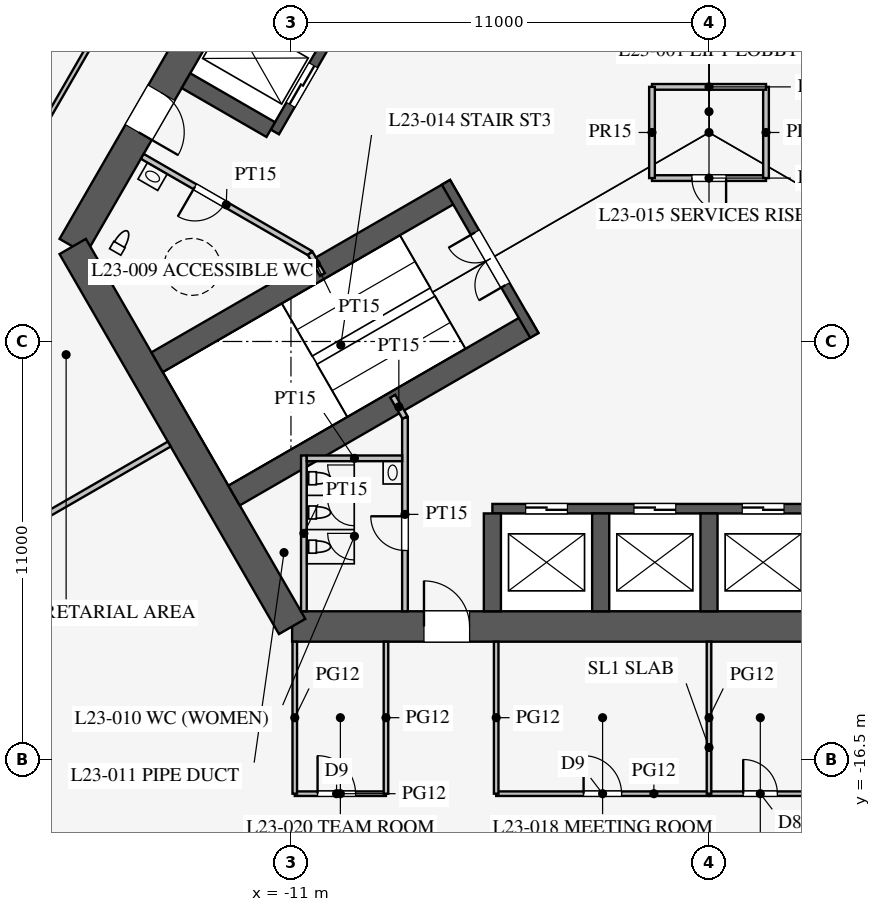
"""IFC4 building model, lengths in metres.
Left out: names, types, materials, properties, quantities, classifications, styles, units other than length and angle.
Written with IfcOpenShell. Run it as: python <this file> out.ifc"""

import sys

from ifc_helpers import new_model, si_unit, direction, frame, frame_2d, origin, place, context, subcontext, project, spatial, rectangle, extrude, element, fill, save


model = new_model("IFC4")
c1 = context("Model", 3, precision=1e-05, world=origin(), true_north=direction((0.0, 1.0)))
c2 = subcontext(c1, "Body", "Model", "MODEL_VIEW")
j1 = project(units=[si_unit("LENGTHUNIT", "METRE"), si_unit("PLANEANGLEUNIT", "RADIAN")], contexts=[c1])
p1 = place(None, origin())
s1 = spatial("IfcSite", under=j1, at=p1, CompositionType="ELEMENT")
p2 = place(p1, origin())
s2 = spatial("IfcBuilding", under=s1, at=p2, CompositionType="ELEMENT")
p3 = place(p2, frame((0.0, 0.0, 103.1)))
s3 = spatial("IfcBuildingStorey", under=s2, at=p3, CompositionType="ELEMENT", Elevation=103.1)
p4 = place(p3, frame((-10.97, -13.0, 0.0), z_axis=(0.0, 0.0, 1.0), x_axis=(1.0, 0.0, 0.0)))
e1 = element("IfcWall", 1, at=p4, inside=s3, PredefinedType="SHEAR", context=c2, shape_type="SweptSolid", body=[
    extrude(rectangle(XDim=21.939, YDim=0.8, at=frame_2d((10.97, 0.0))), origin(), (0.0, 0.0, 1.0), 4.2),
])
p5 = place(p4, frame((17.27, 0.0, 0.0)))
e2 = element("IfcOpeningElement", 2, at=p5, cuts=e1, PredefinedType="OPENING", context=c2, shape_type="SweptSolid", body=[
    extrude(rectangle(XDim=1.2, YDim=2.1, at=frame_2d((0.6, 1.05))), frame((0.0, 0.41, 0.0), z_axis=(0.0, -1.0, 0.0), x_axis=(1.0, 0.0, 0.0)), (0.0, 0.0, 1.0), 0.82),
])
p6 = place(p4, frame((3.47, 0.0, 0.0)))
e3 = element("IfcOpeningElement", 3, at=p6, cuts=e1, PredefinedType="OPENING", context=c2, shape_type="SweptSolid", body=[
    extrude(rectangle(XDim=1.2, YDim=2.1, at=frame_2d((0.6, 1.05))), frame((0.0, 0.41, 0.0), z_axis=(0.0, -1.0, 0.0), x_axis=(1.0, 0.0, 0.0)), (0.0, 0.0, 1.0), 0.82),
])
p7 = place(p3, frame((-5.773, 16.0, 0.0), z_axis=(0.0, 0.0, 1.0), x_axis=(-0.500002442456, -0.866023993627, 0.0)))
e4 = element("IfcWall", 4, at=p7, inside=s3, PredefinedType="SHEAR", context=c2, shape_type="SweptSolid", body=[
    extrude(rectangle(XDim=21.939, YDim=0.8, at=frame_2d((10.97, 0.0))), origin(), (0.0, 0.0, 1.0), 4.2),
])
p8 = place(p7, frame((17.27, 0.0, 0.0)))
e5 = element("IfcOpeningElement", 5, at=p8, cuts=e4, PredefinedType="OPENING", context=c2, shape_type="SweptSolid", body=[
    extrude(rectangle(XDim=1.2, YDim=2.1, at=frame_2d((0.6, 1.05))), frame((0.0, 0.41, 0.0), z_axis=(0.0, -1.0, 0.0), x_axis=(1.0, 0.0, 0.0)), (0.0, 0.0, 1.0), 0.82),
])
p9 = place(p7, frame((3.47, 0.0, 0.0)))
e6 = element("IfcOpeningElement", 6, at=p9, cuts=e4, PredefinedType="OPENING", context=c2, shape_type="SweptSolid", body=[
    extrude(rectangle(XDim=1.2, YDim=2.1, at=frame_2d((0.6, 1.05))), frame((0.0, 0.41, 0.0), z_axis=(0.0, -1.0, 0.0), x_axis=(1.0, 0.0, 0.0)), (0.0, 0.0, 1.0), 0.82),
])
p10 = place(p3, frame((-16.743, -3.0, 0.0), z_axis=(0.0, 0.0, 1.0), x_axis=(0.499995765644, -0.866027848477, 0.0)))
e7 = element("IfcWall", 7, at=p10, inside=s3, PredefinedType="SHEAR", context=c2, shape_type="SweptSolid", body=[
    extrude(rectangle(XDim=11.547, YDim=0.8, at=frame_2d((5.773, 0.0))), origin(), (0.0, 0.0, 1.0), 4.2),
])
p11 = place(p3, frame((-5.7, -9.9, 0.0), z_axis=(0.0, 0.0, 1.0), x_axis=(1.0, 0.0, 0.0)))
e8 = element("IfcWall", 8, at=p11, inside=s3, PredefinedType="SHEAR", context=c2, shape_type="SweptSolid", body=[
    extrude(rectangle(XDim=11.4, YDim=0.25, at=frame_2d((5.7, 0.0))), origin(), (0.0, 0.0, 1.0), 4.2),
])
p12 = place(p11, frame((0.875, 0.0, 0.0)))
e9 = element("IfcOpeningElement", 9, at=p12, cuts=e8, PredefinedType="OPENING", context=c2, shape_type="SweptSolid", body=[
    extrude(rectangle(XDim=1.1, YDim=2.2, at=frame_2d((0.55, 1.1))), frame((0.0, 0.135, 0.0), z_axis=(0.0, -1.0, 0.0), x_axis=(1.0, 0.0, 0.0)), (0.0, 0.0, 1.0), 0.27),
])
p13 = place(p11, frame((3.725, 0.0, 0.0)))
e10 = element("IfcOpeningElement", 10, at=p13, cuts=e8, PredefinedType="OPENING", context=c2, shape_type="SweptSolid", body=[
    extrude(rectangle(XDim=1.1, YDim=2.2, at=frame_2d((0.55, 1.1))), frame((0.0, 0.135, 0.0), z_axis=(0.0, -1.0, 0.0), x_axis=(1.0, 0.0, 0.0)), (0.0, 0.0, 1.0), 0.27),
])
p14 = place(p11, frame((6.575, 0.0, 0.0)))
e11 = element("IfcOpeningElement", 11, at=p14, cuts=e8, PredefinedType="OPENING", context=c2, shape_type="SweptSolid", body=[
    extrude(rectangle(XDim=1.1, YDim=2.2, at=frame_2d((0.55, 1.1))), frame((0.0, 0.135, 0.0), z_axis=(0.0, -1.0, 0.0), x_axis=(1.0, 0.0, 0.0)), (0.0, 0.0, 1.0), 0.27),
])
p15 = place(p11, frame((9.425, 0.0, 0.0)))
e12 = element("IfcOpeningElement", 12, at=p15, cuts=e8, PredefinedType="OPENING", context=c2, shape_type="SweptSolid", body=[
    extrude(rectangle(XDim=1.1, YDim=2.2, at=frame_2d((0.55, 1.1))), frame((0.0, 0.135, 0.0), z_axis=(0.0, -1.0, 0.0), x_axis=(1.0, 0.0, 0.0)), (0.0, 0.0, 1.0), 0.27),
])
for number, where, z_axis, x_axis in (
    (13, (-5.7, -10.025, 0.0), (0.0, 0.0, 1.0), (0.0, -1.0, 0.0)),
    (14, (-2.85, -10.025, 0.0), (0.0, 0.0, 1.0), (0.0, -1.0, 0.0)),
    (15, (0.0, -10.025, 0.0), (0.0, 0.0, 1.0), (0.0, -1.0, 0.0)),
):
    element("IfcWall", number, at=place(p3, frame(where, z_axis=z_axis, x_axis=x_axis)), inside=s3, PredefinedType="SHEAR", context=c2, shape_type="SweptSolid", body=[
        extrude(rectangle(XDim=2.575, YDim=0.45, at=frame_2d((1.288, 0.0))), origin(), (0.0, 0.0, 1.0), 4.2),
    ])
p16 = place(p3, frame((-5.724, 9.886, 0.0), z_axis=(0.0, 0.0, 1.0), x_axis=(-0.500001763848, -0.866024385424, 0.0)))
e16 = element("IfcWall", 16, at=p16, inside=s3, PredefinedType="SHEAR", context=c2, shape_type="SweptSolid", body=[
    extrude(rectangle(XDim=11.4, YDim=0.25, at=frame_2d((5.7, 0.0))), origin(), (0.0, 0.0, 1.0), 4.2),
])
p17 = place(p16, frame((6.525, 0.0, 0.0)))
e17 = element("IfcOpeningElement", 17, at=p17, cuts=e16, PredefinedType="OPENING", context=c2, shape_type="SweptSolid", body=[
    extrude(rectangle(XDim=1.2, YDim=2.2, at=frame_2d((0.6, 1.1))), frame((0.0, 0.135, 0.0), z_axis=(0.0, -1.0, 0.0), x_axis=(1.0, 0.0, 0.0)), (0.0, 0.0, 1.0), 0.27),
])
p18 = place(p16, frame((9.375, 0.0, 0.0)))
e18 = element("IfcOpeningElement", 18, at=p18, cuts=e16, PredefinedType="OPENING", context=c2, shape_type="SweptSolid", body=[
    extrude(rectangle(XDim=1.2, YDim=2.2, at=frame_2d((0.6, 1.1))), frame((0.0, 0.135, 0.0), z_axis=(0.0, -1.0, 0.0), x_axis=(1.0, 0.0, 0.0)), (0.0, 0.0, 1.0), 0.27),
])
p19 = place(p3, frame((-11.532, 0.076, 0.0), z_axis=(0.0, 0.0, 1.0), x_axis=(-0.866005588531, 0.500034319456, 0.0)))
e19 = element("IfcWall", 19, at=p19, inside=s3, PredefinedType="SHEAR", context=c2, shape_type="SweptSolid", body=[
    extrude(rectangle(XDim=2.575, YDim=0.45, at=frame_2d((1.288, 0.0))), origin(), (0.0, 0.0, 1.0), 4.2),
])
for number, where, z_axis, x_axis in (
    (20, (-6.663, -1.509, 0.0), (0.0, 0.0, 1.0), (-0.866, -0.5, 0.0)),
    (21, (-4.638, -5.016, 0.0), (0.0, 0.0, 1.0), (-0.866, -0.5, 0.0)),
):
    element("IfcWall", number, at=place(p3, frame(where, z_axis=z_axis, x_axis=x_axis)), inside=s3, PredefinedType="SHEAR", context=c2, shape_type="SweptSolid", body=[
        extrude(rectangle(XDim=9.075, YDim=0.6, at=frame_2d((4.538, 0.0))), origin(), (0.0, 0.0, 1.0), 4.2),
    ])
p20 = place(p3, frame((-6.922, -1.312, 0.0), z_axis=(0.0, 0.0, 1.0), x_axis=(0.499984536904, -0.866034331223, 0.0)))
e22 = element("IfcWall", 22, at=p20, inside=s3, PredefinedType="SHEAR", context=c2, shape_type="SweptSolid", body=[
    extrude(rectangle(XDim=4.65, YDim=0.25, at=frame_2d((2.325, 0.0))), origin(), (0.0, 0.0, 1.0), 4.2),
])
p21 = place(p20, frame((1.525, 0.0, 0.0)))
e23 = element("IfcOpeningElement", 23, at=p21, cuts=e22, PredefinedType="OPENING", context=c2, shape_type="SweptSolid", body=[
    extrude(rectangle(XDim=1.6, YDim=2.1, at=frame_2d((0.8, 1.05))), frame((0.0, 0.135, 0.0), z_axis=(0.0, -1.0, 0.0), x_axis=(1.0, 0.0, 0.0)), (0.0, 0.0, 1.0), 0.27),
])
p22 = place(p3, frame((-8.0, -7.5, 0.0), z_axis=(0.0, 0.0, 1.0), x_axis=(0.0, -1.0, 0.0)))
e24 = element("IfcWall", 24, at=p22, inside=s3, PredefinedType="PARTITIONING", context=c2, shape_type="SweptSolid", body=[
    extrude(rectangle(XDim=5.1, YDim=0.15, at=frame_2d((2.55, 0.0))), origin(), (0.0, 0.0, 1.0), 4.0),
])
p23 = place(p22, frame((2.6, 0.0, 0.0)))
e25 = element("IfcOpeningElement", 25, at=p23, cuts=e24, PredefinedType="OPENING", context=c2, shape_type="SweptSolid", body=[
    extrude(rectangle(XDim=0.9, YDim=2.1, at=frame_2d((0.45, 1.05))), frame((0.0, 0.085, 0.0), z_axis=(0.0, -1.0, 0.0), x_axis=(1.0, 0.0, 0.0)), (0.0, 0.0, 1.0), 0.17),
])
p24 = place(p3, frame((-10.495, -3.178, 0.0), z_axis=(0.0, 0.0, 1.0), x_axis=(-0.86602216432, 0.500005610874, 0.0)))
e26 = element("IfcWall", 26, at=p24, inside=s3, PredefinedType="PARTITIONING", context=c2, shape_type="SweptSolid", body=[
    extrude(rectangle(XDim=5.1, YDim=0.15, at=frame_2d((2.55, 0.0))), origin(), (0.0, 0.0, 1.0), 4.0),
])
p25 = place(p24, frame((2.6, 0.0, 0.0)))
e27 = element("IfcOpeningElement", 27, at=p25, cuts=e26, PredefinedType="OPENING", context=c2, shape_type="SweptSolid", body=[
    extrude(rectangle(XDim=0.9, YDim=2.1, at=frame_2d((0.45, 1.05))), frame((0.0, 0.085, 0.0), z_axis=(0.0, -1.0, 0.0), x_axis=(1.0, 0.0, 0.0)), (0.0, 0.0, 1.0), 0.17),
])
for number, where, z_axis, x_axis in (
    (28, (-10.495, -3.178, 0.0), (0.0, 0.0, 1.0), (0.5, -0.866, 0.0)),
    (29, (-8.0, -7.5, 0.0), (0.0, 0.0, 1.0), (-0.5, 0.866, 0.0)),
):
    element("IfcWall", number, at=place(p3, frame(where, z_axis=z_axis, x_axis=x_axis)), inside=s3, PredefinedType="PARTITIONING", context=c2, shape_type="SweptSolid", body=[
        extrude(rectangle(XDim=0.645, YDim=0.15, at=frame_2d((0.323, 0.0))), origin(), (0.0, 0.0, 1.0), 4.0),
    ])
p26 = place(p3, frame((-10.66, -8.5, 0.0), z_axis=(0.0, 0.0, 1.0), x_axis=(0.0, -1.0, 0.0)))
e30 = element("IfcWall", 30, at=p26, inside=s3, PredefinedType="PARTITIONING", context=c2, shape_type="SweptSolid", body=[
    extrude(rectangle(XDim=4.1, YDim=0.15, at=frame_2d((2.05, 0.0))), origin(), (0.0, 0.0, 1.0), 4.0),
])
p27 = place(p3, frame((-8.075, -8.575, 0.0), z_axis=(0.0, 0.0, 1.0), x_axis=(-1.0, 0.0, 0.0)))
e31 = element("IfcWall", 31, at=p27, inside=s3, PredefinedType="PARTITIONING", context=c2, shape_type="SweptSolid", body=[
    extrude(rectangle(XDim=2.51, YDim=0.15, at=frame_2d((1.255, 0.0))), origin(), (0.0, 0.0, 1.0), 4.0),
])
p28 = place(p3, frame((-1.5, -1.2, 0.0), z_axis=(0.0, 0.0, 1.0), x_axis=(1.0, 0.0, 0.0)))
e32 = element("IfcWall", 32, at=p28, inside=s3, PredefinedType="PARTITIONING", context=c2, shape_type="SweptSolid", body=[
    extrude(rectangle(XDim=3.0, YDim=0.15, at=frame_2d((1.5, 0.0))), origin(), (0.0, 0.0, 1.0), 4.0),
])
p29 = place(p28, frame((1.05, 0.0, 0.0)))
e33 = element("IfcOpeningElement", 33, at=p29, cuts=e32, PredefinedType="OPENING", context=c2, shape_type="SweptSolid", body=[
    extrude(rectangle(XDim=0.9, YDim=2.1, at=frame_2d((0.45, 1.05))), frame((0.0, 0.085, 0.0), z_axis=(0.0, -1.0, 0.0), x_axis=(1.0, 0.0, 0.0)), (0.0, 0.0, 1.0), 0.17),
])
p30 = place(p3, frame((1.5, -1.2, 0.0), z_axis=(0.0, 0.0, 1.0), x_axis=(0.0, 1.0, 0.0)))
e34 = element("IfcWall", 34, at=p30, inside=s3, PredefinedType="PARTITIONING", context=c2, shape_type="SweptSolid", body=[
    extrude(rectangle(XDim=2.4, YDim=0.15, at=frame_2d((1.2, 0.0))), origin(), (0.0, 0.0, 1.0), 4.0),
])
p31 = place(p3, frame((1.5, 1.2, 0.0), z_axis=(0.0, 0.0, 1.0), x_axis=(-1.0, 0.0, 0.0)))
e35 = element("IfcWall", 35, at=p31, inside=s3, PredefinedType="PARTITIONING", context=c2, shape_type="SweptSolid", body=[
    extrude(rectangle(XDim=3.0, YDim=0.15, at=frame_2d((1.5, 0.0))), origin(), (0.0, 0.0, 1.0), 4.0),
])
p32 = place(p3, frame((-1.5, 1.2, 0.0), z_axis=(0.0, 0.0, 1.0), x_axis=(0.0, -1.0, 0.0)))
e36 = element("IfcWall", 36, at=p32, inside=s3, PredefinedType="PARTITIONING", context=c2, shape_type="SweptSolid", body=[
    extrude(rectangle(XDim=2.4, YDim=0.15, at=frame_2d((1.2, 0.0))), origin(), (0.0, 0.0, 1.0), 4.0),
])
p33 = place(p3, frame((-14.203, -8.2, 0.0), z_axis=(0.0, 0.0, 1.0), x_axis=(-0.866024668836, -0.500001272966, 0.0)))
e37 = element("IfcWall", 37, at=p33, inside=s3, PredefinedType="PARTITIONING", context=c2, shape_type="SweptSolid", body=[
    extrude(rectangle(XDim=16.65, YDim=0.15, at=frame_2d((8.325, 0.0))), origin(), (0.0, 0.0, 1.0), 2.3),
])
p34 = place(p3, frame((0.0, -17.4, 0.0), z_axis=(0.0, 0.0, 1.0), x_axis=(1.0, 0.0, 0.0)))
e38 = element("IfcWall", 38, at=p34, inside=s3, PredefinedType="PARTITIONING", context=c2, shape_type="SweptSolid", body=[
    extrude(rectangle(XDim=2.7, YDim=0.12, at=frame_2d((1.35, 0.0))), origin(), (0.0, 0.0, 1.0), 2.9),
])
p35 = place(p34, frame((0.9, 0.0, 0.15)))
e39 = element("IfcOpeningElement", 39, at=p35, cuts=e38, PredefinedType="OPENING", context=c2, shape_type="SweptSolid", body=[
    extrude(rectangle(XDim=0.9, YDim=2.1, at=frame_2d((0.45, 1.05))), frame((0.0, 0.07, 0.0), z_axis=(0.0, -1.0, 0.0), x_axis=(1.0, 0.0, 0.0)), (0.0, 0.0, 1.0), 0.14),
])
p36 = place(p3, frame((-10.9, -17.4, 0.0), z_axis=(0.0, 0.0, 1.0), x_axis=(1.0, 0.0, 0.0)))
e40 = element("IfcWall", 40, at=p36, inside=s3, PredefinedType="PARTITIONING", context=c2, shape_type="SweptSolid", body=[
    extrude(rectangle(XDim=2.4, YDim=0.12, at=frame_2d((1.2, 0.0))), origin(), (0.0, 0.0, 1.0), 2.9),
])
p37 = place(p36, frame((0.6, 0.0, 0.15)))
e41 = element("IfcOpeningElement", 41, at=p37, cuts=e40, PredefinedType="OPENING", context=c2, shape_type="SweptSolid", body=[
    extrude(rectangle(XDim=1.0, YDim=2.1, at=frame_2d((0.5, 1.05))), frame((0.0, 0.07, 0.0), z_axis=(0.0, -1.0, 0.0), x_axis=(1.0, 0.0, 0.0)), (0.0, 0.0, 1.0), 0.14),
])
p38 = place(p3, frame((-5.6, -17.4, 0.0), z_axis=(0.0, 0.0, 1.0), x_axis=(1.0, 0.0, 0.0)))
e42 = element("IfcWall", 42, at=p38, inside=s3, PredefinedType="PARTITIONING", context=c2, shape_type="SweptSolid", body=[
    extrude(rectangle(XDim=5.6, YDim=0.12, at=frame_2d((2.8, 0.0))), origin(), (0.0, 0.0, 1.0), 2.9),
])
p39 = place(p38, frame((2.3, 0.0, 0.15)))
e43 = element("IfcOpeningElement", 43, at=p39, cuts=e42, PredefinedType="OPENING", context=c2, shape_type="SweptSolid", body=[
    extrude(rectangle(XDim=1.0, YDim=2.1, at=frame_2d((0.5, 1.05))), frame((0.0, 0.07, 0.0), z_axis=(0.0, -1.0, 0.0), x_axis=(1.0, 0.0, 0.0)), (0.0, 0.0, 1.0), 0.14),
])
p40 = place(p3, frame((0.0, -13.4, 0.0), z_axis=(0.0, 0.0, 1.0), x_axis=(0.0, -1.0, 0.0)))
e44 = element("IfcWall", 44, at=p40, inside=s3, PredefinedType="PARTITIONING", context=c2, shape_type="SweptSolid", body=[
    extrude(rectangle(XDim=4.0, YDim=0.12, at=frame_2d((2.0, 0.0))), origin(), (0.0, 0.0, 1.0), 2.4),
])
for number, where, z_axis, x_axis in (
    (45, (-10.9, -13.4, 0.0), (0.0, 0.0, 1.0), (0.0, -1.0, 0.0)),
    (46, (-5.6, -13.4, 0.0), (0.0, 0.0, 1.0), (0.0, -1.0, 0.0)),
    (47, (-8.5, -13.4, 0.0), (0.0, 0.0, 1.0), (0.0, -1.0, 0.0)),
):
    element("IfcWall", number, at=place(p3, frame(where, z_axis=z_axis, x_axis=x_axis)), inside=s3, PredefinedType="PARTITIONING", context=c2, shape_type="SweptSolid", body=[
        extrude(rectangle(XDim=4.0, YDim=0.12, at=frame_2d((2.0, 0.0))), origin(), (0.0, 0.0, 1.0), 2.9),
    ])
p41 = place(p3, frame((-0.016, 30.491, 0.0), z_axis=(0.0, 0.0, 1.0), x_axis=(-0.50000091641, -0.866024874695, 0.0)))
e48 = element("IfcWall", 48, at=p41, inside=s3, PredefinedType="PARTITIONING", context=c2, shape_type="SweptSolid", body=[
    extrude(rectangle(XDim=52.796, YDim=0.12, at=frame_2d((26.398, 0.0))), origin(), (0.0, 0.0, 1.0), 2.9),
])
p42 = place(p41, frame((10.2, 0.0, 0.15)))
e49 = element("IfcOpeningElement", 49, at=p42, cuts=e48, PredefinedType="OPENING", context=c2, shape_type="SweptSolid", body=[
    extrude(rectangle(XDim=1.8, YDim=2.1, at=frame_2d((0.9, 1.05))), frame((0.0, 0.07, 0.0), z_axis=(0.0, -1.0, 0.0), x_axis=(1.0, 0.0, 0.0)), (0.0, 0.0, 1.0), 0.14),
])
p43 = place(p41, frame((40.8, 0.0, 0.15)))
e50 = element("IfcOpeningElement", 50, at=p43, cuts=e48, PredefinedType="OPENING", context=c2, shape_type="SweptSolid", body=[
    extrude(rectangle(XDim=1.8, YDim=2.1, at=frame_2d((0.9, 1.05))), frame((0.0, 0.07, 0.0), z_axis=(0.0, -1.0, 0.0), x_axis=(1.0, 0.0, 0.0)), (0.0, 0.0, 1.0), 0.14),
])
p44 = place(p23, frame((0.9, 0.0, 0.0), z_axis=(0.0, 0.0, 1.0), x_axis=(-1.0, 0.0, 0.0)))
e51 = element("IfcDoor", 51, at=p44, inside=s3, OperationType="SINGLE_SWING_RIGHT", PredefinedType="DOOR", context=c2, shape_type="SweptSolid", body=[
    extrude(rectangle(XDim=0.9, YDim=2.1, at=frame_2d((0.45, 1.05))), frame((0.0, 0.025, 0.0), z_axis=(0.0, -1.0, 0.0), x_axis=(1.0, 0.0, 0.0)), (0.0, 0.0, 1.0), 0.05),
])
fill(e25, e51)
p45 = place(p25, origin())
e52 = element("IfcDoor", 52, at=p45, inside=s3, OperationType="SINGLE_SWING_RIGHT", PredefinedType="DOOR", context=c2, shape_type="SweptSolid", body=[
    extrude(rectangle(XDim=0.9, YDim=2.1, at=frame_2d((0.45, 1.05))), frame((0.0, 0.025, 0.0), z_axis=(0.0, -1.0, 0.0), x_axis=(1.0, 0.0, 0.0)), (0.0, 0.0, 1.0), 0.05),
])
fill(e27, e52)
p46 = place(p29, frame((0.9, 0.0, 0.0), z_axis=(0.0, 0.0, 1.0), x_axis=(-1.0, 0.0, 0.0)))
e53 = element("IfcDoor", 53, at=p46, inside=s3, OperationType="SINGLE_SWING_LEFT", PredefinedType="DOOR", context=c2, shape_type="SweptSolid", body=[
    extrude(rectangle(XDim=0.9, YDim=2.1, at=frame_2d((0.45, 1.05))), frame((0.0, 0.025, 0.0), z_axis=(0.0, -1.0, 0.0), x_axis=(1.0, 0.0, 0.0)), (0.0, 0.0, 1.0), 0.05),
])
fill(e33, e53)
p47 = place(p21, frame((1.6, 0.0, 0.0), z_axis=(0.0, 0.0, 1.0), x_axis=(-1.0, 0.0, 0.0)))
e54 = element("IfcDoor", 54, at=p47, inside=s3, OperationType="DOUBLE_DOOR_SINGLE_SWING", PredefinedType="DOOR", context=c2, shape_type="SweptSolid", body=[
    extrude(rectangle(XDim=1.6, YDim=2.1, at=frame_2d((0.8, 1.05))), frame((0.0, 0.025, 0.0), z_axis=(0.0, -1.0, 0.0), x_axis=(1.0, 0.0, 0.0)), (0.0, 0.0, 1.0), 0.05),
])
fill(e23, e54)
p48 = place(p6, origin())
e55 = element("IfcDoor", 55, at=p48, inside=s3, OperationType="SINGLE_SWING_LEFT", PredefinedType="DOOR", context=c2, shape_type="SweptSolid", body=[
    extrude(rectangle(XDim=1.2, YDim=2.1, at=frame_2d((0.6, 1.05))), frame((0.0, 0.025, 0.0), z_axis=(0.0, -1.0, 0.0), x_axis=(1.0, 0.0, 0.0)), (0.0, 0.0, 1.0), 0.05),
])
fill(e3, e55)
p49 = place(p8, origin())
e56 = element("IfcDoor", 56, at=p49, inside=s3, OperationType="SINGLE_SWING_RIGHT", PredefinedType="DOOR", context=c2, shape_type="SweptSolid", body=[
    extrude(rectangle(XDim=1.2, YDim=2.1, at=frame_2d((0.6, 1.05))), frame((0.0, 0.025, 0.0), z_axis=(0.0, -1.0, 0.0), x_axis=(1.0, 0.0, 0.0)), (0.0, 0.0, 1.0), 0.05),
])
fill(e5, e56)
p50 = place(p39, origin())
e57 = element("IfcDoor", 57, at=p50, inside=s3, OperationType="SINGLE_SWING_LEFT", PredefinedType="DOOR", context=c2, shape_type="SweptSolid", body=[
    extrude(rectangle(XDim=1.0, YDim=2.1, at=frame_2d((0.5, 1.05))), frame((0.0, 0.025, 0.0), z_axis=(0.0, -1.0, 0.0), x_axis=(1.0, 0.0, 0.0)), (0.0, 0.0, 1.0), 0.05),
])
fill(e43, e57)
p51 = place(p35, origin())
e58 = element("IfcDoor", 58, at=p51, inside=s3, OperationType="SINGLE_SWING_LEFT", PredefinedType="DOOR", context=c2, shape_type="SweptSolid", body=[
    extrude(rectangle(XDim=0.9, YDim=2.1, at=frame_2d((0.45, 1.05))), frame((0.0, 0.025, 0.0), z_axis=(0.0, -1.0, 0.0), x_axis=(1.0, 0.0, 0.0)), (0.0, 0.0, 1.0), 0.05),
])
fill(e39, e58)
p52 = place(p37, origin())
e59 = element("IfcDoor", 59, at=p52, inside=s3, OperationType="SINGLE_SWING_LEFT", PredefinedType="DOOR", context=c2, shape_type="SweptSolid", body=[
    extrude(rectangle(XDim=1.0, YDim=2.1, at=frame_2d((0.5, 1.05))), frame((0.0, 0.025, 0.0), z_axis=(0.0, -1.0, 0.0), x_axis=(1.0, 0.0, 0.0)), (0.0, 0.0, 1.0), 0.05),
])
fill(e41, e59)
p53 = place(p12, origin())
e60 = element("IfcDoor", 60, at=p53, inside=s3, OperationType="DOUBLE_DOOR_SLIDING", PredefinedType="DOOR", context=c2, shape_type="SweptSolid", body=[
    extrude(rectangle(XDim=1.1, YDim=2.2, at=frame_2d((0.55, 1.1))), frame((0.0, 0.025, 0.0), z_axis=(0.0, -1.0, 0.0), x_axis=(1.0, 0.0, 0.0)), (0.0, 0.0, 1.0), 0.05),
])
fill(e9, e60)
p54 = place(p13, origin())
e61 = element("IfcDoor", 61, at=p54, inside=s3, OperationType="DOUBLE_DOOR_SLIDING", PredefinedType="DOOR", context=c2, shape_type="SweptSolid", body=[
    extrude(rectangle(XDim=1.1, YDim=2.2, at=frame_2d((0.55, 1.1))), frame((0.0, 0.025, 0.0), z_axis=(0.0, -1.0, 0.0), x_axis=(1.0, 0.0, 0.0)), (0.0, 0.0, 1.0), 0.05),
])
fill(e10, e61)
p55 = place(p14, origin())
e62 = element("IfcDoor", 62, at=p55, inside=s3, OperationType="DOUBLE_DOOR_SLIDING", PredefinedType="DOOR", context=c2, shape_type="SweptSolid", body=[
    extrude(rectangle(XDim=1.1, YDim=2.2, at=frame_2d((0.55, 1.1))), frame((0.0, 0.025, 0.0), z_axis=(0.0, -1.0, 0.0), x_axis=(1.0, 0.0, 0.0)), (0.0, 0.0, 1.0), 0.05),
])
fill(e11, e62)
p56 = place(p18, origin())
e63 = element("IfcDoor", 63, at=p56, inside=s3, OperationType="DOUBLE_DOOR_SLIDING", PredefinedType="DOOR", context=c2, shape_type="SweptSolid", body=[
    extrude(rectangle(XDim=1.2, YDim=2.2, at=frame_2d((0.6, 1.1))), frame((0.0, 0.025, 0.0), z_axis=(0.0, -1.0, 0.0), x_axis=(1.0, 0.0, 0.0)), (0.0, 0.0, 1.0), 0.05),
])
fill(e18, e63)
save(model, sys.argv[1])
